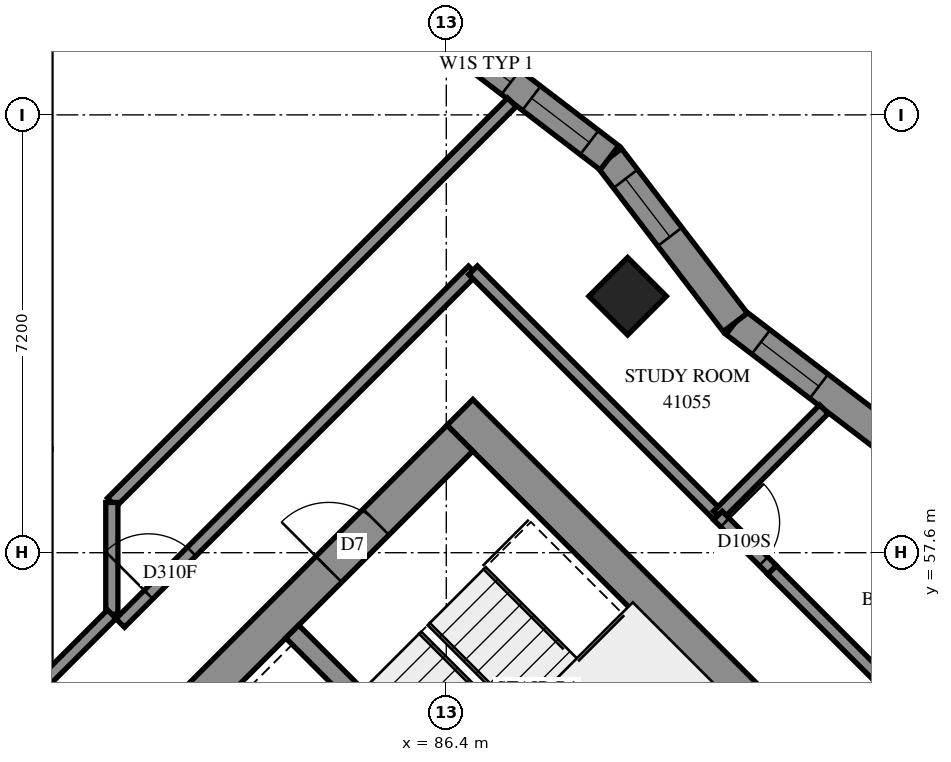
"""IFC4 building model, lengths in metres.
Left out: names, types, materials, properties, quantities, classifications, styles, units other than length and angle.
Written with IfcOpenShell. Run it as: python <this file> out.ifc"""

import sys

from ifc_helpers import new_model, si_unit, direction, frame, frame_2d, origin, origin_2d, place, context, subcontext, project, spatial, polyline, rectangle, outline, extrude, element, fill, save


model = new_model("IFC4")
c1 = context("Model", 3, precision=1e-05, world=origin(), true_north=direction((0.0, 1.0)))
c2 = subcontext(c1, "Body", "Model", "MODEL_VIEW")
j1 = project(units=[si_unit("LENGTHUNIT", "METRE"), si_unit("PLANEANGLEUNIT", "RADIAN")], contexts=[c1])
p1 = place(None, origin())
s1 = spatial("IfcSite", under=j1, at=p1, CompositionType="ELEMENT")
p2 = place(p1, origin())
s2 = spatial("IfcBuilding", under=s1, at=p2, CompositionType="ELEMENT")
p3 = place(p2, frame((0.0, 0.0, 152.4)))
s3 = spatial("IfcBuildingStorey", under=s2, at=p3, CompositionType="ELEMENT", Elevation=152.4)
p4 = place(p3, frame((89.382, 61.818, 0.0), z_axis=(0.0, 0.0, 1.0), x_axis=(0.7071067812, -0.7071067812, 0.0)))
e1 = element("IfcColumn", 1, at=p4, inside=s3, PredefinedType="COLUMN", context=c2, shape_type="SweptSolid", body=[
    extrude(rectangle(XDim=0.9, YDim=0.9, at=origin_2d()), origin(), (0.0, 0.0, 1.0), 3.1),
])
p5 = place(p3, frame((86.625, 59.908, -0.3), z_axis=(0.0, 0.0, 1.0), x_axis=(0.7071067812, -0.7071067812, 0.0)))
e2 = element("IfcWall", 2, at=p5, inside=s3, PredefinedType="SHEAR", context=c2, shape_type="SweptSolid", body=[
    extrude(rectangle(XDim=15.6, YDim=0.6, at=frame_2d((7.8, 0.0))), origin(), (0.0, 0.0, 1.0), 2.7),
])
p6 = place(p5, frame((10.6, 0.0, 0.3)))
e3 = element("IfcOpeningElement", 3, at=p6, cuts=e2, PredefinedType="OPENING", context=c2, shape_type="SweptSolid", body=[
    extrude(rectangle(XDim=0.8, YDim=2.1, at=frame_2d((0.4, 1.05))), frame((0.0, 0.31, 0.0), z_axis=(0.0, -1.0, 0.0), x_axis=(1.0, 0.0, 0.0)), (0.0, 0.0, 1.0), 0.62),
])
p7 = place(p3, frame((76.442, 49.302, -0.3), z_axis=(0.0, 0.0, 1.0), x_axis=(0.7071067812, 0.7071067812, 0.0)))
e4 = element("IfcWall", 4, at=p7, inside=s3, PredefinedType="SHEAR", context=c2, shape_type="SweptSolid", body=[
    extrude(rectangle(XDim=14.4, YDim=0.6, at=frame_2d((7.2, 0.0))), origin(), (0.0, 0.0, 1.0), 2.7),
])
p8 = place(p7, frame((4.55, 0.0, 0.3)))
e5 = element("IfcOpeningElement", 5, at=p8, cuts=e4, PredefinedType="OPENING", context=c2, shape_type="SweptSolid", body=[
    extrude(rectangle(XDim=1.1, YDim=2.1, at=frame_2d((0.55, 1.05))), frame((0.0, 0.31, 0.0), z_axis=(0.0, -1.0, 0.0), x_axis=(1.0, 0.0, 0.0)), (0.0, 0.0, 1.0), 0.62),
])
p9 = place(p7, frame((11.35, 0.0, 0.3)))
e6 = element("IfcOpeningElement", 6, at=p9, cuts=e4, PredefinedType="OPENING", context=c2, shape_type="SweptSolid", body=[
    extrude(rectangle(XDim=1.1, YDim=2.1, at=frame_2d((0.55, 1.05))), frame((0.0, 0.31, 0.0), z_axis=(0.0, -1.0, 0.0), x_axis=(1.0, 0.0, 0.0)), (0.0, 0.0, 1.0), 0.62),
])
p10 = place(p3, frame((83.867, 56.302, 0.0), z_axis=(0.0, 0.0, 1.0), x_axis=(0.7071137256, -0.7070998367, 0.0)))
e7 = element("IfcWall", 7, at=p10, inside=s3, PredefinedType="SOLIDWALL", context=c2, shape_type="SweptSolid", body=[
    extrude(rectangle(XDim=7.2, YDim=0.3, at=frame_2d((3.6, 0.0))), origin(), (0.0, 0.0, 1.0), 3.1),
])
p11 = place(p3, frame((93.86, 59.318, 0.0), z_axis=(0.0, 0.0, 1.0), x_axis=(-0.7944694348, 0.6073041389, 0.0)))
e8 = element("IfcWall", 8, at=p11, inside=s3, PredefinedType="SOLIDWALL", context=c2, shape_type="SweptSolid", body=[
    extrude(outline(polyline([(-0.033, -0.25), (3.374, -0.25), (3.441, 0.25), (0.033, 0.25), (-0.033, -0.25)])), origin(), (0.0, 0.0, 1.0), 3.1),
])
p12 = place(p11, frame((1.677, 0.0, 0.45)))
e9 = element("IfcOpeningElement", 9, at=p12, cuts=e8, PredefinedType="OPENING", context=c2, shape_type="SweptSolid", body=[
    extrude(rectangle(XDim=1.2, YDim=2.5, at=frame_2d((0.6, 1.25))), frame((0.0, 0.26, 0.0), z_axis=(0.0, -1.0, 0.0), x_axis=(1.0, 0.0, 0.0)), (0.0, 0.0, 1.0), 0.52),
])
p13 = place(p3, frame((91.153, 61.388, 0.0), z_axis=(0.0, 0.0, 1.0), x_axis=(-0.6073041389, 0.7944694348, 0.0)))
e10 = element("IfcWall", 10, at=p13, inside=s3, PredefinedType="SOLIDWALL", context=c2, shape_type="SweptSolid", body=[
    extrude(outline(polyline([(0.033, -0.25), (3.441, -0.25), (3.374, 0.25), (-0.033, 0.25), (0.033, -0.25)])), origin(), (0.0, 0.0, 1.0), 3.1),
])
p14 = place(p13, frame((1.772, 0.0, 0.45)))
e11 = element("IfcOpeningElement", 11, at=p14, cuts=e10, PredefinedType="OPENING", context=c2, shape_type="SweptSolid", body=[
    extrude(rectangle(XDim=1.2, YDim=2.5, at=frame_2d((0.6, 1.25))), frame((0.0, 0.26, 0.0), z_axis=(0.0, -1.0, 0.0), x_axis=(1.0, 0.0, 0.0)), (0.0, 0.0, 1.0), 0.52),
])
p15 = place(p3, frame((89.083, 64.095, 0.0), z_axis=(0.0, 0.0, 1.0), x_axis=(-0.7944694348, 0.6073041389, 0.0)))
e12 = element("IfcWall", 12, at=p15, inside=s3, PredefinedType="SOLIDWALL", context=c2, shape_type="SweptSolid", body=[
    extrude(outline(polyline([(-0.033, -0.25), (3.374, -0.25), (3.441, 0.25), (0.033, 0.25), (-0.033, -0.25)])), origin(), (0.0, 0.0, 1.0), 3.1),
])
p16 = place(p15, frame((0.414, 0.0, 0.45)))
e13 = element("IfcOpeningElement", 13, at=p16, cuts=e12, PredefinedType="OPENING", context=c2, shape_type="SweptSolid", body=[
    extrude(rectangle(XDim=1.2, YDim=2.5, at=frame_2d((0.6, 1.25))), frame((0.0, 0.26, 0.0), z_axis=(0.0, -1.0, 0.0), x_axis=(1.0, 0.0, 0.0)), (0.0, 0.0, 1.0), 0.52),
])
p17 = place(p15, frame((2.043, 0.0, 0.45)))
e14 = element("IfcOpeningElement", 14, at=p17, cuts=e12, PredefinedType="OPENING", context=c2, shape_type="SweptSolid", body=[
    extrude(rectangle(XDim=1.0, YDim=2.5, at=frame_2d((0.5, 1.25))), frame((0.0, 0.26, 0.0), z_axis=(0.0, -1.0, 0.0), x_axis=(1.0, 0.0, 0.0)), (0.0, 0.0, 1.0), 0.52),
])
p18 = place(p3, frame((91.755, 57.317, 0.0), z_axis=(0.0, 0.0, 1.0), x_axis=(0.7071067812, -0.7071067812, 0.0)))
e15 = element("IfcWall", 15, at=p18, inside=s3, PredefinedType="PARTITIONING", context=c2, shape_type="SweptSolid", body=[
    extrude(rectangle(XDim=11.639, YDim=0.2, at=frame_2d((5.819, 0.0))), origin(), (0.0, 0.0, 1.0), 3.1),
])
p19 = place(p3, frame((80.899, 58.427, 0.0), z_axis=(0.0, 0.0, 1.0), x_axis=(0.7071121545, 0.7071014078, 0.0)))
e16 = element("IfcWall", 16, at=p19, inside=s3, PredefinedType="PARTITIONING", context=c2, shape_type="SweptSolid", body=[
    extrude(rectangle(XDim=9.305, YDim=0.2, at=frame_2d((4.653, 0.0))), origin(), (0.0, 0.0, 1.0), 3.1),
])
p20 = place(p3, frame((81.038, 56.444, 0.0), z_axis=(0.0, 0.0, 1.0), x_axis=(0.7071067812, 0.7071067812, 0.0)))
e17 = element("IfcWall", 17, at=p20, inside=s3, PredefinedType="PARTITIONING", context=c2, shape_type="SweptSolid", body=[
    extrude(rectangle(XDim=8.2, YDim=0.2, at=frame_2d((4.1, 0.0))), origin(), (0.0, 0.0, 1.0), 3.1),
])
p21 = place(p20, frame((0.66, 0.0, 0.0)))
e18 = element("IfcOpeningElement", 18, at=p21, cuts=e17, PredefinedType="OPENING", context=c2, shape_type="SweptSolid", body=[
    extrude(rectangle(XDim=1.0, YDim=2.1, at=frame_2d((0.5, 1.05))), frame((0.0, 0.11, 0.0), z_axis=(0.0, -1.0, 0.0), x_axis=(1.0, 0.0, 0.0)), (0.0, 0.0, 1.0), 0.22),
])
p22 = place(p3, frame((86.841, 62.245, 0.0), z_axis=(0.0, 0.0, 1.0), x_axis=(0.7071067812, -0.7071067812, 0.0)))
e19 = element("IfcWall", 19, at=p22, inside=s3, PredefinedType="PARTITIONING", context=c2, shape_type="SweptSolid", body=[
    extrude(rectangle(XDim=5.699, YDim=0.2, at=frame_2d((2.85, 0.0))), origin(), (0.0, 0.0, 1.0), 3.1),
])
p23 = place(p3, frame((90.867, 58.213, 0.0), z_axis=(0.0, 0.0, 1.0), x_axis=(0.7066202121, 0.7075930157, 0.0)))
e20 = element("IfcWall", 20, at=p23, inside=s3, PredefinedType="PARTITIONING", context=c2, shape_type="SweptSolid", body=[
    extrude(rectangle(XDim=2.467, YDim=0.2, at=frame_2d((1.234, 0.0))), origin(), (0.0, 0.0, 1.0), 3.1),
])
p24 = place(p3, frame((80.9, 56.588, 0.0), z_axis=(0.0, 0.0, 1.0), x_axis=(0.0, 1.0, 0.0)))
e21 = element("IfcWall", 21, at=p24, inside=s3, PredefinedType="PARTITIONING", context=c2, shape_type="SweptSolid", body=[
    extrude(rectangle(XDim=1.838, YDim=0.2, at=frame_2d((0.919, 0.0))), origin(), (0.0, 0.0, 1.0), 3.1),
])
p25 = place(p3, frame((79.801, 55.491, 0.0), z_axis=(0.0, 0.0, 1.0), x_axis=(0.7071067812, 0.7071067812, 0.0)))
e22 = element("IfcWall", 22, at=p25, inside=s3, PredefinedType="PARTITIONING", context=c2, shape_type="SweptSolid", body=[
    extrude(rectangle(XDim=1.553, YDim=0.2, at=frame_2d((0.776, 0.0))), origin(), (0.0, 0.0, 1.0), 3.1),
])
p26 = place(p3, frame((90.867, 58.211, 0.0), z_axis=(0.0, 0.0, 1.0), x_axis=(0.706312726, -0.7078999456, 0.0)))
e23 = element("IfcWall", 23, at=p26, inside=s3, PredefinedType="PARTITIONING", context=c2, shape_type="SweptSolid", body=[
    extrude(rectangle(XDim=1.26, YDim=0.2, at=frame_2d((0.63, 0.0))), origin(), (0.0, 0.0, 1.0), 3.1),
])
p27 = place(p26, frame((0.162, 0.0, 0.0)))
e24 = element("IfcOpeningElement", 24, at=p27, cuts=e23, PredefinedType="OPENING", context=c2, shape_type="SweptSolid", body=[
    extrude(rectangle(XDim=0.9, YDim=2.1, at=frame_2d((0.45, 1.05))), frame((0.0, 0.11, 0.0), z_axis=(0.0, -1.0, 0.0), x_axis=(1.0, 0.0, 0.0)), (0.0, 0.0, 1.0), 0.22),
])
p28 = place(p12, origin())
e25 = element("IfcWindow", 25, at=p28, inside=s3, PartitioningType="SINGLE_PANEL", PredefinedType="WINDOW", context=c2, shape_type="SweptSolid", body=[
    extrude(rectangle(XDim=1.2, YDim=2.5, at=frame_2d((0.6, 1.25))), frame((0.0, 0.18, 0.0), z_axis=(0.0, -1.0, 0.0), x_axis=(1.0, 0.0, 0.0)), (0.0, 0.0, 1.0), 0.06),
])
fill(e9, e25)
p29 = place(p14, origin())
e26 = element("IfcWindow", 26, at=p29, inside=s3, PartitioningType="SINGLE_PANEL", PredefinedType="WINDOW", context=c2, shape_type="SweptSolid", body=[
    extrude(rectangle(XDim=1.2, YDim=2.5, at=frame_2d((0.6, 1.25))), frame((0.0, 0.18, 0.0), z_axis=(0.0, -1.0, 0.0), x_axis=(1.0, 0.0, 0.0)), (0.0, 0.0, 1.0), 0.06),
])
fill(e11, e26)
p30 = place(p16, origin())
e27 = element("IfcWindow", 27, at=p30, inside=s3, PartitioningType="SINGLE_PANEL", PredefinedType="WINDOW", context=c2, shape_type="SweptSolid", body=[
    extrude(rectangle(XDim=1.2, YDim=2.5, at=frame_2d((0.6, 1.25))), frame((0.0, 0.18, 0.0), z_axis=(0.0, -1.0, 0.0), x_axis=(1.0, 0.0, 0.0)), (0.0, 0.0, 1.0), 0.06),
])
fill(e13, e27)
p31 = place(p9, origin())
e28 = element("IfcDoor", 28, at=p31, inside=s3, OperationType="SINGLE_SWING_LEFT", PredefinedType="DOOR", context=c2, shape_type="SweptSolid", body=[
    extrude(rectangle(XDim=1.1, YDim=2.1, at=frame_2d((0.55, 1.05))), frame((0.0, 0.025, 0.0), z_axis=(0.0, -1.0, 0.0), x_axis=(1.0, 0.0, 0.0)), (0.0, 0.0, 1.0), 0.05),
])
fill(e6, e28)
p32 = place(p21, origin())
e29 = element("IfcDoor", 29, at=p32, inside=s3, OperationType="SINGLE_SWING_RIGHT", PredefinedType="DOOR", context=c2, shape_type="SweptSolid", body=[
    extrude(rectangle(XDim=1.0, YDim=2.1, at=frame_2d((0.5, 1.05))), frame((0.0, 0.025, 0.0), z_axis=(0.0, -1.0, 0.0), x_axis=(1.0, 0.0, 0.0)), (0.0, 0.0, 1.0), 0.05),
])
fill(e18, e29)
p33 = place(p27, origin())
e30 = element("IfcDoor", 30, at=p33, inside=s3, OperationType="SINGLE_SWING_RIGHT", PredefinedType="DOOR", context=c2, shape_type="SweptSolid", body=[
    extrude(rectangle(XDim=0.9, YDim=2.1, at=frame_2d((0.45, 1.05))), frame((0.0, 0.025, 0.0), z_axis=(0.0, -1.0, 0.0), x_axis=(1.0, 0.0, 0.0)), (0.0, 0.0, 1.0), 0.05),
])
fill(e24, e30)
p34 = place(p17, origin())
e31 = element("IfcWindow", 31, at=p34, inside=s3, PartitioningType="SINGLE_PANEL", PredefinedType="WINDOW", context=c2, shape_type="SweptSolid", body=[
    extrude(rectangle(XDim=1.0, YDim=2.5, at=frame_2d((0.5, 1.25))), frame((0.0, 0.18, 0.0), z_axis=(0.0, -1.0, 0.0), x_axis=(1.0, 0.0, 0.0)), (0.0, 0.0, 1.0), 0.06),
])
fill(e14, e31)
save(model, sys.argv[1])
